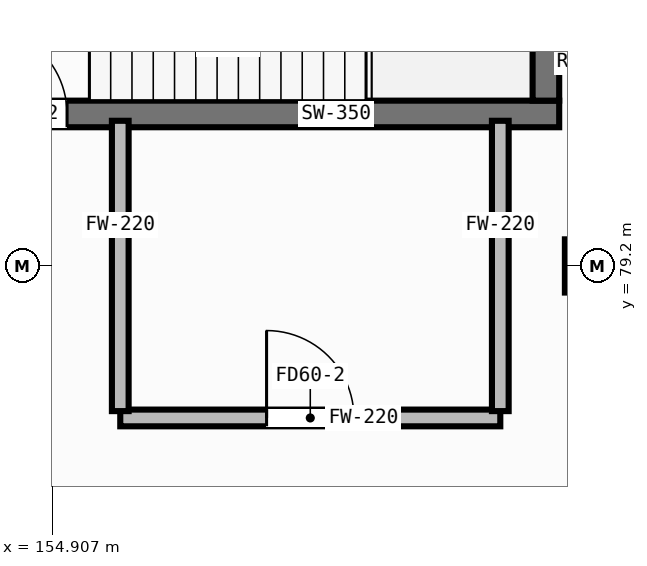
"""IFC4 building model, lengths in metres.
Left out: names, types, materials, properties, quantities, classifications, styles, units other than length and angle.
Written with IfcOpenShell. Run it as: python <this file> out.ifc"""

import sys

from ifc_helpers import new_model, si_unit, direction, frame, frame_2d, origin, origin_2d, place, context, subcontext, project, spatial, rectangle, hollow_rectangle, extrude, element, fill, save


model = new_model("IFC4")
c1 = context("Model", 3, precision=1e-05, world=origin(), true_north=direction((0.0, 1.0)))
c2 = subcontext(c1, "Body", "Model", "MODEL_VIEW")
j1 = project(units=[si_unit("LENGTHUNIT", "METRE"), si_unit("PLANEANGLEUNIT", "RADIAN")], contexts=[c1])
p1 = place(None, origin())
s1 = spatial("IfcSite", under=j1, at=p1, CompositionType="ELEMENT")
p2 = place(p1, origin())
s2 = spatial("IfcBuilding", under=s1, at=p2, CompositionType="ELEMENT")
p3 = place(p2, frame((0.0, 0.0, -4.9)))
s3 = spatial("IfcBuildingStorey", under=s2, at=p3, CompositionType="ELEMENT", Elevation=-4.9)
p4 = place(p3, frame((162.0, 79.2, 0.0), z_axis=(0.0, 0.0, 1.0), x_axis=(1.0, 0.0, 0.0)))
e1 = element("IfcColumn", 1, at=p4, inside=s3, PredefinedType="COLUMN", context=c2, shape_type="SweptSolid", body=[
    extrude(hollow_rectangle(XDim=0.7, YDim=0.7, WallThickness=0.028, at=origin_2d()), origin(), (0.0, 0.0, 1.0), 4.9),
])
p5 = place(p3, frame((153.425, 81.2, 0.0), z_axis=(0.0, 0.0, 1.0), x_axis=(1.0, 0.0, 0.0)))
e2 = element("IfcWall", 2, at=p5, inside=s3, PredefinedType="SHEAR", context=c2, shape_type="SweptSolid", body=[
    extrude(rectangle(XDim=8.15, YDim=0.35, at=frame_2d((4.075, 0.0))), origin(), (0.0, 0.0, 1.0), 4.625),
])
p6 = place(p5, frame((0.525, 0.0, 0.0)))
e3 = element("IfcOpeningElement", 3, at=p6, cuts=e2, PredefinedType="OPENING", context=c2, shape_type="SweptSolid", body=[
    extrude(rectangle(XDim=1.15, YDim=2.1, at=frame_2d((0.575, 1.05))), frame((0.0, 0.187, 0.0), z_axis=(0.0, -1.0, 0.0), x_axis=(1.0, 0.0, 0.0)), (0.0, 0.0, 1.0), 0.374),
])
p7 = place(p3, frame((161.4, 81.375, 0.0), z_axis=(0.0, 0.0, 1.0), x_axis=(0.0, 1.0, 0.0)))
e4 = element("IfcWall", 4, at=p7, inside=s3, PredefinedType="SHEAR", context=c2, shape_type="SweptSolid", body=[
    extrude(rectangle(XDim=3.55, YDim=0.35, at=frame_2d((1.775, 0.0))), origin(), (0.0, 0.0, 1.0), 4.625),
])
p8 = place(p3, frame((155.8, 77.2, 0.0), z_axis=(0.0, 0.0, 1.0), x_axis=(1.0, 0.0, 0.0)))
e5 = element("IfcWall", 5, at=p8, inside=s3, PredefinedType="PARTITIONING", context=c2, shape_type="SweptSolid", body=[
    extrude(rectangle(XDim=5.0, YDim=0.22, at=frame_2d((2.5, 0.0))), origin(), (0.0, 0.0, 1.0), 4.625),
])
p9 = place(p8, frame((1.925, 0.0, 0.0)))
e6 = element("IfcOpeningElement", 6, at=p9, cuts=e5, PredefinedType="OPENING", context=c2, shape_type="SweptSolid", body=[
    extrude(rectangle(XDim=1.15, YDim=2.1, at=frame_2d((0.575, 1.05))), frame((0.0, 0.122, 0.0), z_axis=(0.0, -1.0, 0.0), x_axis=(1.0, 0.0, 0.0)), (0.0, 0.0, 1.0), 0.244),
])
for number, where, z_axis, x_axis in (
    (7, (155.8, 77.29, 0.0), (0.0, 0.0, 1.0), (0.0, 1.0, 0.0)),
    (8, (160.8, 77.29, 0.0), (0.0, 0.0, 1.0), (0.0, 1.0, 0.0)),
):
    element("IfcWall", number, at=place(p3, frame(where, z_axis=z_axis, x_axis=x_axis)), inside=s3, PredefinedType="PARTITIONING", context=c2, shape_type="SweptSolid", body=[
        extrude(rectangle(XDim=3.82, YDim=0.22, at=frame_2d((1.91, 0.0))), origin(), (0.0, 0.0, 1.0), 4.625),
    ])
p10 = place(p6, origin())
e9 = element("IfcDoor", 9, at=p10, inside=s3, OperationType="SINGLE_SWING_LEFT", PredefinedType="DOOR", context=c2, shape_type="SweptSolid", body=[
    extrude(rectangle(XDim=1.15, YDim=2.1, at=frame_2d((0.575, 1.05))), frame((0.0, 0.025, 0.0), z_axis=(0.0, -1.0, 0.0), x_axis=(1.0, 0.0, 0.0)), (0.0, 0.0, 1.0), 0.05),
])
fill(e3, e9)
p11 = place(p9, origin())
e10 = element("IfcDoor", 10, at=p11, inside=s3, OperationType="SINGLE_SWING_LEFT", PredefinedType="DOOR", context=c2, shape_type="SweptSolid", body=[
    extrude(rectangle(XDim=1.15, YDim=2.1, at=frame_2d((0.575, 1.05))), frame((0.0, 0.025, 0.0), z_axis=(0.0, -1.0, 0.0), x_axis=(1.0, 0.0, 0.0)), (0.0, 0.0, 1.0), 0.05),
])
fill(e6, e10)
save(model, sys.argv[1])
